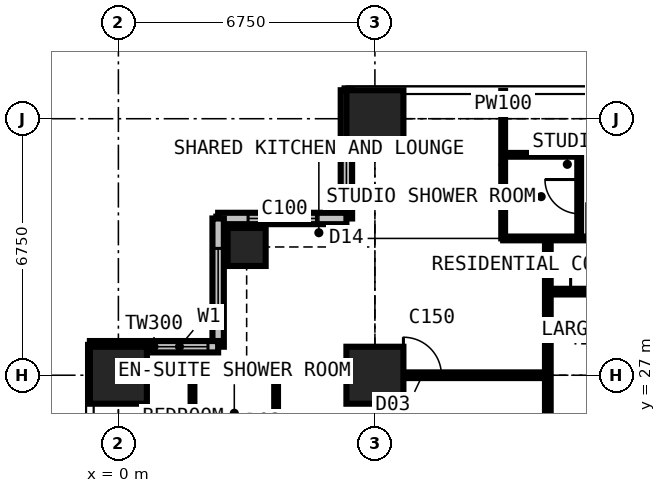
"""IFC4 building model, lengths in metres.
Left out: names, types, materials, properties, quantities, classifications, styles, units other than length and angle.
Written with IfcOpenShell. Run it as: python <this file> out.ifc"""

import sys

from ifc_helpers import new_model, si_unit, direction, frame, frame_2d, origin, origin_2d, place, context, subcontext, project, spatial, rectangle, extrude, element, fill, save


model = new_model("IFC4")
c1 = context("Model", 3, precision=1e-05, world=origin(), true_north=direction((0.0, 1.0)))
c2 = subcontext(c1, "Body", "Model", "MODEL_VIEW")
j1 = project(units=[si_unit("LENGTHUNIT", "METRE"), si_unit("PLANEANGLEUNIT", "RADIAN")], contexts=[c1])
p1 = place(None, origin())
s1 = spatial("IfcSite", under=j1, at=p1, CompositionType="ELEMENT")
p2 = place(p1, origin())
s2 = spatial("IfcBuilding", under=s1, at=p2, CompositionType="ELEMENT")
p3 = place(p2, frame((0.0, 0.0, 126.9)))
s3 = spatial("IfcBuildingStorey", under=s2, at=p3, CompositionType="ELEMENT", Elevation=126.9)
p4 = place(p3, frame((0.0, 27.0, 0.0), z_axis=(0.0, 0.0, 1.0), x_axis=(1.0, 0.0, 0.0)))
e1 = element("IfcColumn", 1, at=p4, inside=s3, PredefinedType="COLUMN", context=c2, shape_type="SweptSolid", body=[
    extrude(rectangle(XDim=1.5, YDim=1.5, at=origin_2d()), origin(), (0.0, 0.0, 1.0), 3.6),
])
p5 = place(p3, frame((3.375, 30.375, 0.0), z_axis=(0.0, 0.0, 1.0), x_axis=(1.0, 0.0, 0.0)))
e2 = element("IfcColumn", 2, at=p5, inside=s3, PredefinedType="COLUMN", context=c2, shape_type="SweptSolid", body=[
    extrude(rectangle(XDim=1.0, YDim=1.0, at=origin_2d()), origin(), (0.0, 0.0, 1.0), 3.6),
])
for number, where, z_axis, x_axis in (
    (3, (6.75, 27.0, 0.0), (0.0, 0.0, 1.0), (1.0, 0.0, 0.0)),
    (4, (6.75, 33.75, 0.0), (0.0, 0.0, 1.0), (1.0, 0.0, 0.0)),
):
    element("IfcColumn", number, at=place(p3, frame(where, z_axis=z_axis, x_axis=x_axis)), inside=s3, PredefinedType="COLUMN", context=c2, shape_type="SweptSolid", body=[
        extrude(rectangle(XDim=1.5, YDim=1.5, at=origin_2d()), origin(), (0.0, 0.0, 1.0), 3.6),
    ])
p6 = place(p3, frame((6.0, 34.5, 0.0), z_axis=(0.0, 0.0, 1.0), x_axis=(0.0, -1.0, 0.0)))
e5 = element("IfcWall", 5, at=p6, inside=s3, PredefinedType="SOLIDWALL", context=c2, shape_type="SweptSolid", body=[
    extrude(rectangle(XDim=3.375, YDim=0.3, at=frame_2d((1.688, 0.0))), origin(), (0.0, 0.0, 1.0), 3.375),
])
p7 = place(p6, frame((1.607, 0.0, 0.9)))
e6 = element("IfcOpeningElement", 6, at=p7, cuts=e5, PredefinedType="OPENING", context=c2, shape_type="SweptSolid", body=[
    extrude(rectangle(XDim=1.5, YDim=1.8, at=frame_2d((0.75, 0.9))), frame((0.0, 0.16, 0.0), z_axis=(0.0, -1.0, 0.0), x_axis=(1.0, 0.0, 0.0)), (0.0, 0.0, 1.0), 0.32),
])
p8 = place(p3, frame((6.0, 31.125, 0.0), z_axis=(0.0, 0.0, 1.0), x_axis=(-1.0, 0.0, 0.0)))
e7 = element("IfcWall", 7, at=p8, inside=s3, PredefinedType="SOLIDWALL", context=c2, shape_type="SweptSolid", body=[
    extrude(rectangle(XDim=3.375, YDim=0.3, at=frame_2d((1.688, 0.0))), origin(), (0.0, 0.0, 1.0), 3.375),
])
p9 = place(p8, frame((0.788, 0.0, 0.6)))
e8 = element("IfcOpeningElement", 8, at=p9, cuts=e7, PredefinedType="OPENING", context=c2, shape_type="SweptSolid", body=[
    extrude(rectangle(XDim=1.8, YDim=2.1, at=frame_2d((0.9, 1.05))), frame((0.0, 0.16, 0.0), z_axis=(0.0, -1.0, 0.0), x_axis=(1.0, 0.0, 0.0)), (0.0, 0.0, 1.0), 0.32),
])
p10 = place(p3, frame((2.625, 31.125, 0.0), z_axis=(0.0, 0.0, 1.0), x_axis=(0.0, -1.0, 0.0)))
e9 = element("IfcWall", 9, at=p10, inside=s3, PredefinedType="SOLIDWALL", context=c2, shape_type="SweptSolid", body=[
    extrude(rectangle(XDim=3.375, YDim=0.3, at=frame_2d((1.688, 0.0))), origin(), (0.0, 0.0, 1.0), 3.375),
])
p11 = place(p10, frame((0.788, 0.0, 0.6)))
e10 = element("IfcOpeningElement", 10, at=p11, cuts=e9, PredefinedType="OPENING", context=c2, shape_type="SweptSolid", body=[
    extrude(rectangle(XDim=1.8, YDim=2.1, at=frame_2d((0.9, 1.05))), frame((0.0, 0.16, 0.0), z_axis=(0.0, -1.0, 0.0), x_axis=(1.0, 0.0, 0.0)), (0.0, 0.0, 1.0), 0.32),
])
p12 = place(p3, frame((2.625, 27.75, 0.0), z_axis=(0.0, 0.0, 1.0), x_axis=(-1.0, 0.0, 0.0)))
e11 = element("IfcWall", 11, at=p12, inside=s3, PredefinedType="SOLIDWALL", context=c2, shape_type="SweptSolid", body=[
    extrude(rectangle(XDim=3.375, YDim=0.3, at=frame_2d((1.688, 0.0))), origin(), (0.0, 0.0, 1.0), 3.375),
])
p13 = place(p12, frame((0.268, 0.0, 0.9)))
e12 = element("IfcOpeningElement", 12, at=p13, cuts=e11, PredefinedType="OPENING", context=c2, shape_type="SweptSolid", body=[
    extrude(rectangle(XDim=1.5, YDim=1.8, at=frame_2d((0.75, 0.9))), frame((0.0, 0.16, 0.0), z_axis=(0.0, -1.0, 0.0), x_axis=(1.0, 0.0, 0.0)), (0.0, 0.0, 1.0), 0.32),
])
p14 = place(p3, frame((-0.734, 27.0, 0.0), z_axis=(0.0, 0.0, 1.0), x_axis=(1.0, 0.0, 0.0)))
e13 = element("IfcWall", 13, at=p14, inside=s3, PredefinedType="PARTITIONING", context=c2, shape_type="SweptSolid", body=[
    extrude(rectangle(XDim=12.034, YDim=0.15, at=frame_2d((6.017, 0.0))), origin(), (0.0, 0.0, 1.0), 2.806),
])
p15 = place(p14, frame((8.234, 0.0, 0.0)))
e14 = element("IfcOpeningElement", 14, at=p15, cuts=e13, PredefinedType="OPENING", context=c2, shape_type="SweptSolid", body=[
    extrude(rectangle(XDim=1.0, YDim=2.2, at=frame_2d((0.5, 1.1))), frame((0.0, 0.085, 0.0), z_axis=(0.0, -1.0, 0.0), x_axis=(1.0, 0.0, 0.0)), (0.0, 0.0, 1.0), 0.17),
])
p16 = place(p3, frame((1.95, 25.0, 0.0), z_axis=(0.0, 0.0, 1.0), x_axis=(0.0, 1.0, 0.0)))
e15 = element("IfcWall", 15, at=p16, inside=s3, PredefinedType="PARTITIONING", context=c2, shape_type="SweptSolid", body=[
    extrude(rectangle(XDim=2.0, YDim=0.1, at=frame_2d((1.0, 0.0))), origin(), (0.0, 0.0, 1.0), 3.375),
])
p17 = place(p3, frame((4.15, 10.125, 0.0), z_axis=(0.0, 0.0, 1.0), x_axis=(0.0, 1.0, 0.0)))
e16 = element("IfcWall", 16, at=p17, inside=s3, PredefinedType="PARTITIONING", context=c2, shape_type="SweptSolid", body=[
    extrude(rectangle(XDim=16.875, YDim=0.1, at=frame_2d((8.438, 0.0))), origin(), (0.0, 0.0, 1.0), 3.375),
])
p18 = place(p17, frame((13.7, 0.0, 0.0)))
e17 = element("IfcOpeningElement", 17, at=p18, cuts=e16, PredefinedType="OPENING", context=c2, shape_type="SweptSolid", body=[
    extrude(rectangle(XDim=0.95, YDim=2.2, at=frame_2d((0.475, 1.1))), frame((0.0, 0.06, 0.0), z_axis=(0.0, -1.0, 0.0), x_axis=(1.0, 0.0, 0.0)), (0.0, 0.0, 1.0), 0.12),
])
p19 = place(p17, frame((0.2, 0.0, 0.0)))
e18 = element("IfcOpeningElement", 18, at=p19, cuts=e16, PredefinedType="OPENING", context=c2, shape_type="SweptSolid", body=[
    extrude(rectangle(XDim=0.95, YDim=2.2, at=frame_2d((0.475, 1.1))), frame((0.0, 0.06, 0.0), z_axis=(0.0, -1.0, 0.0), x_axis=(1.0, 0.0, 0.0)), (0.0, 0.0, 1.0), 0.12),
])
p20 = place(p17, frame((3.625, 0.0, 0.0)))
e19 = element("IfcOpeningElement", 19, at=p20, cuts=e16, PredefinedType="OPENING", context=c2, shape_type="SweptSolid", body=[
    extrude(rectangle(XDim=0.95, YDim=2.2, at=frame_2d((0.475, 1.1))), frame((0.0, 0.06, 0.0), z_axis=(0.0, -1.0, 0.0), x_axis=(1.0, 0.0, 0.0)), (0.0, 0.0, 1.0), 0.12),
])
p21 = place(p17, frame((7.0, 0.0, 0.0)))
e20 = element("IfcOpeningElement", 20, at=p21, cuts=e16, PredefinedType="OPENING", context=c2, shape_type="SweptSolid", body=[
    extrude(rectangle(XDim=0.95, YDim=2.2, at=frame_2d((0.475, 1.1))), frame((0.0, 0.06, 0.0), z_axis=(0.0, -1.0, 0.0), x_axis=(1.0, 0.0, 0.0)), (0.0, 0.0, 1.0), 0.12),
])
p22 = place(p17, frame((10.375, 0.0, 0.0)))
e21 = element("IfcOpeningElement", 21, at=p22, cuts=e16, PredefinedType="OPENING", context=c2, shape_type="SweptSolid", body=[
    extrude(rectangle(XDim=0.95, YDim=2.2, at=frame_2d((0.475, 1.1))), frame((0.0, 0.06, 0.0), z_axis=(0.0, -1.0, 0.0), x_axis=(1.0, 0.0, 0.0)), (0.0, 0.0, 1.0), 0.12),
])
p23 = place(p3, frame((10.125, 30.6, 0.0), z_axis=(0.0, 0.0, 1.0), x_axis=(0.0, 1.0, 0.0)))
e22 = element("IfcWall", 22, at=p23, inside=s3, PredefinedType="PARTITIONING", context=c2, shape_type="SweptSolid", body=[
    extrude(rectangle(XDim=3.884, YDim=0.1, at=frame_2d((1.942, 0.0))), origin(), (0.0, 0.0, 1.0), 3.375),
])
p24 = place(p3, frame((10.125, 30.6, 0.0), z_axis=(0.0, 0.0, 1.0), x_axis=(1.0, 0.0, 0.0)))
e23 = element("IfcWall", 23, at=p24, inside=s3, PredefinedType="PARTITIONING", context=c2, shape_type="SweptSolid", body=[
    extrude(rectangle(XDim=3.375, YDim=0.1, at=frame_2d((1.688, 0.0))), origin(), (0.0, 0.0, 1.0), 3.375),
])
p25 = place(p24, frame((2.2, 0.0, 0.0)))
e24 = element("IfcOpeningElement", 24, at=p25, cuts=e23, PredefinedType="OPENING", context=c2, shape_type="SweptSolid", body=[
    extrude(rectangle(XDim=0.95, YDim=2.2, at=frame_2d((0.475, 1.1))), frame((0.0, 0.06, 0.0), z_axis=(0.0, -1.0, 0.0), x_axis=(1.0, 0.0, 0.0)), (0.0, 0.0, 1.0), 0.12),
])
p26 = place(p3, frame((10.125, 32.8, 0.0), z_axis=(0.0, 0.0, 1.0), x_axis=(1.0, 0.0, 0.0)))
e25 = element("IfcWall", 25, at=p26, inside=s3, PredefinedType="PARTITIONING", context=c2, shape_type="SweptSolid", body=[
    extrude(rectangle(XDim=2.0, YDim=0.1, at=frame_2d((1.0, 0.0))), origin(), (0.0, 0.0, 1.0), 3.375),
])
p27 = place(p3, frame((11.3, 11.3, 0.0), z_axis=(0.0, 0.0, 1.0), x_axis=(0.0, 1.0, 0.0)))
e26 = element("IfcWall", 26, at=p27, inside=s3, PredefinedType="PARTITIONING", context=c2, shape_type="SweptSolid", body=[
    extrude(rectangle(XDim=19.3, YDim=0.15, at=frame_2d((9.65, 0.0))), origin(), (0.0, 0.0, 1.0), 3.375),
])
p28 = place(p27, frame((13.525, 0.0, 0.0)))
e27 = element("IfcOpeningElement", 27, at=p28, cuts=e26, PredefinedType="OPENING", context=c2, shape_type="SweptSolid", body=[
    extrude(rectangle(XDim=1.0, YDim=2.2, at=frame_2d((0.5, 1.1))), frame((0.0, 0.085, 0.0), z_axis=(0.0, -1.0, 0.0), x_axis=(1.0, 0.0, 0.0)), (0.0, 0.0, 1.0), 0.17),
])
p29 = place(p27, frame((10.438, 0.0, 0.0)))
e28 = element("IfcOpeningElement", 28, at=p29, cuts=e26, PredefinedType="OPENING", context=c2, shape_type="SweptSolid", body=[
    extrude(rectangle(XDim=1.0, YDim=2.2, at=frame_2d((0.5, 1.1))), frame((0.0, 0.085, 0.0), z_axis=(0.0, -1.0, 0.0), x_axis=(1.0, 0.0, 0.0)), (0.0, 0.0, 1.0), 0.17),
])
p30 = place(p3, frame((11.3, 29.2, 0.0), z_axis=(0.0, 0.0, 1.0), x_axis=(1.0, 0.0, 0.0)))
e29 = element("IfcWall", 29, at=p30, inside=s3, PredefinedType="PARTITIONING", context=c2, shape_type="SweptSolid", body=[
    extrude(rectangle(XDim=19.075, YDim=0.15, at=frame_2d((9.538, 0.0))), origin(), (0.0, 0.0, 1.0), 3.375),
])
p31 = place(p30, frame((6.4, 0.0, 0.0)))
e30 = element("IfcOpeningElement", 30, at=p31, cuts=e29, PredefinedType="OPENING", context=c2, shape_type="SweptSolid", body=[
    extrude(rectangle(XDim=0.95, YDim=2.2, at=frame_2d((0.475, 1.1))), frame((0.0, 0.085, 0.0), z_axis=(0.0, -1.0, 0.0), x_axis=(1.0, 0.0, 0.0)), (0.0, 0.0, 1.0), 0.17),
])
p32 = place(p30, frame((9.2, 0.0, 0.0)))
e31 = element("IfcOpeningElement", 31, at=p32, cuts=e29, PredefinedType="OPENING", context=c2, shape_type="SweptSolid", body=[
    extrude(rectangle(XDim=0.95, YDim=2.2, at=frame_2d((0.475, 1.1))), frame((0.0, 0.085, 0.0), z_axis=(0.0, -1.0, 0.0), x_axis=(1.0, 0.0, 0.0)), (0.0, 0.0, 1.0), 0.17),
])
p33 = place(p30, frame((0.6, 0.0, 0.0)))
e32 = element("IfcOpeningElement", 32, at=p33, cuts=e29, PredefinedType="OPENING", context=c2, shape_type="SweptSolid", body=[
    extrude(rectangle(XDim=1.0, YDim=2.2, at=frame_2d((0.5, 1.1))), frame((0.0, 0.085, 0.0), z_axis=(0.0, -1.0, 0.0), x_axis=(1.0, 0.0, 0.0)), (0.0, 0.0, 1.0), 0.17),
])
p34 = place(p3, frame((12.125, 30.6, 0.0), z_axis=(0.0, 0.0, 1.0), x_axis=(0.0, 1.0, 0.0)))
e33 = element("IfcWall", 33, at=p34, inside=s3, PredefinedType="PARTITIONING", context=c2, shape_type="SweptSolid", body=[
    extrude(rectangle(XDim=2.2, YDim=0.1, at=frame_2d((1.1, 0.0))), origin(), (0.0, 0.0, 1.0), 3.375),
])
p35 = place(p34, frame((0.65, 0.0, 0.0)))
e34 = element("IfcOpeningElement", 34, at=p35, cuts=e33, PredefinedType="OPENING", context=c2, shape_type="SweptSolid", body=[
    extrude(rectangle(XDim=0.9, YDim=2.2, at=frame_2d((0.45, 1.1))), frame((0.0, 0.06, 0.0), z_axis=(0.0, -1.0, 0.0), x_axis=(1.0, 0.0, 0.0)), (0.0, 0.0, 1.0), 0.12),
])
p36 = place(p7, origin())
e35 = element("IfcWindow", 35, at=p36, inside=s3, PartitioningType="SINGLE_PANEL", PredefinedType="WINDOW", context=c2, shape_type="SweptSolid", body=[
    extrude(rectangle(XDim=1.5, YDim=1.8, at=frame_2d((0.75, 0.9))), frame((0.0, 0.03, 0.0), z_axis=(0.0, -1.0, 0.0), x_axis=(1.0, 0.0, 0.0)), (0.0, 0.0, 1.0), 0.06),
])
fill(e6, e35)
p37 = place(p9, origin())
e36 = element("IfcWindow", 36, at=p37, inside=s3, PartitioningType="SINGLE_PANEL", PredefinedType="WINDOW", context=c2, shape_type="SweptSolid", body=[
    extrude(rectangle(XDim=1.8, YDim=2.1, at=frame_2d((0.9, 1.05))), frame((0.0, 0.03, 0.0), z_axis=(0.0, -1.0, 0.0), x_axis=(1.0, 0.0, 0.0)), (0.0, 0.0, 1.0), 0.06),
])
fill(e8, e36)
p38 = place(p11, origin())
e37 = element("IfcWindow", 37, at=p38, inside=s3, PartitioningType="SINGLE_PANEL", PredefinedType="WINDOW", context=c2, shape_type="SweptSolid", body=[
    extrude(rectangle(XDim=1.8, YDim=2.1, at=frame_2d((0.9, 1.05))), frame((0.0, 0.03, 0.0), z_axis=(0.0, -1.0, 0.0), x_axis=(1.0, 0.0, 0.0)), (0.0, 0.0, 1.0), 0.06),
])
fill(e10, e37)
p39 = place(p13, origin())
e38 = element("IfcWindow", 38, at=p39, inside=s3, PartitioningType="SINGLE_PANEL", PredefinedType="WINDOW", context=c2, shape_type="SweptSolid", body=[
    extrude(rectangle(XDim=1.5, YDim=1.8, at=frame_2d((0.75, 0.9))), frame((0.0, 0.03, 0.0), z_axis=(0.0, -1.0, 0.0), x_axis=(1.0, 0.0, 0.0)), (0.0, 0.0, 1.0), 0.06),
])
fill(e12, e38)
p40 = place(p35, origin())
e39 = element("IfcDoor", 39, at=p40, inside=s3, OperationType="SINGLE_SWING_RIGHT", PredefinedType="DOOR", context=c2, shape_type="SweptSolid", body=[
    extrude(rectangle(XDim=0.9, YDim=2.2, at=frame_2d((0.45, 1.1))), frame((0.0, 0.025, 0.0), z_axis=(0.0, -1.0, 0.0), x_axis=(1.0, 0.0, 0.0)), (0.0, 0.0, 1.0), 0.05),
])
fill(e34, e39)
p41 = place(p33, origin())
e40 = element("IfcDoor", 40, at=p41, inside=s3, OperationType="SINGLE_SWING_LEFT", PredefinedType="DOOR", context=c2, shape_type="SweptSolid", body=[
    extrude(rectangle(XDim=1.0, YDim=2.2, at=frame_2d((0.5, 1.1))), frame((0.0, 0.025, 0.0), z_axis=(0.0, -1.0, 0.0), x_axis=(1.0, 0.0, 0.0)), (0.0, 0.0, 1.0), 0.05),
])
fill(e32, e40)
p42 = place(p15, origin())
e41 = element("IfcDoor", 41, at=p42, inside=s3, OperationType="SINGLE_SWING_LEFT", PredefinedType="DOOR", context=c2, shape_type="SweptSolid", body=[
    extrude(rectangle(XDim=1.0, YDim=2.2, at=frame_2d((0.5, 1.1))), frame((0.0, 0.025, 0.0), z_axis=(0.0, -1.0, 0.0), x_axis=(1.0, 0.0, 0.0)), (0.0, 0.0, 1.0), 0.05),
])
fill(e14, e41)
save(model, sys.argv[1])
